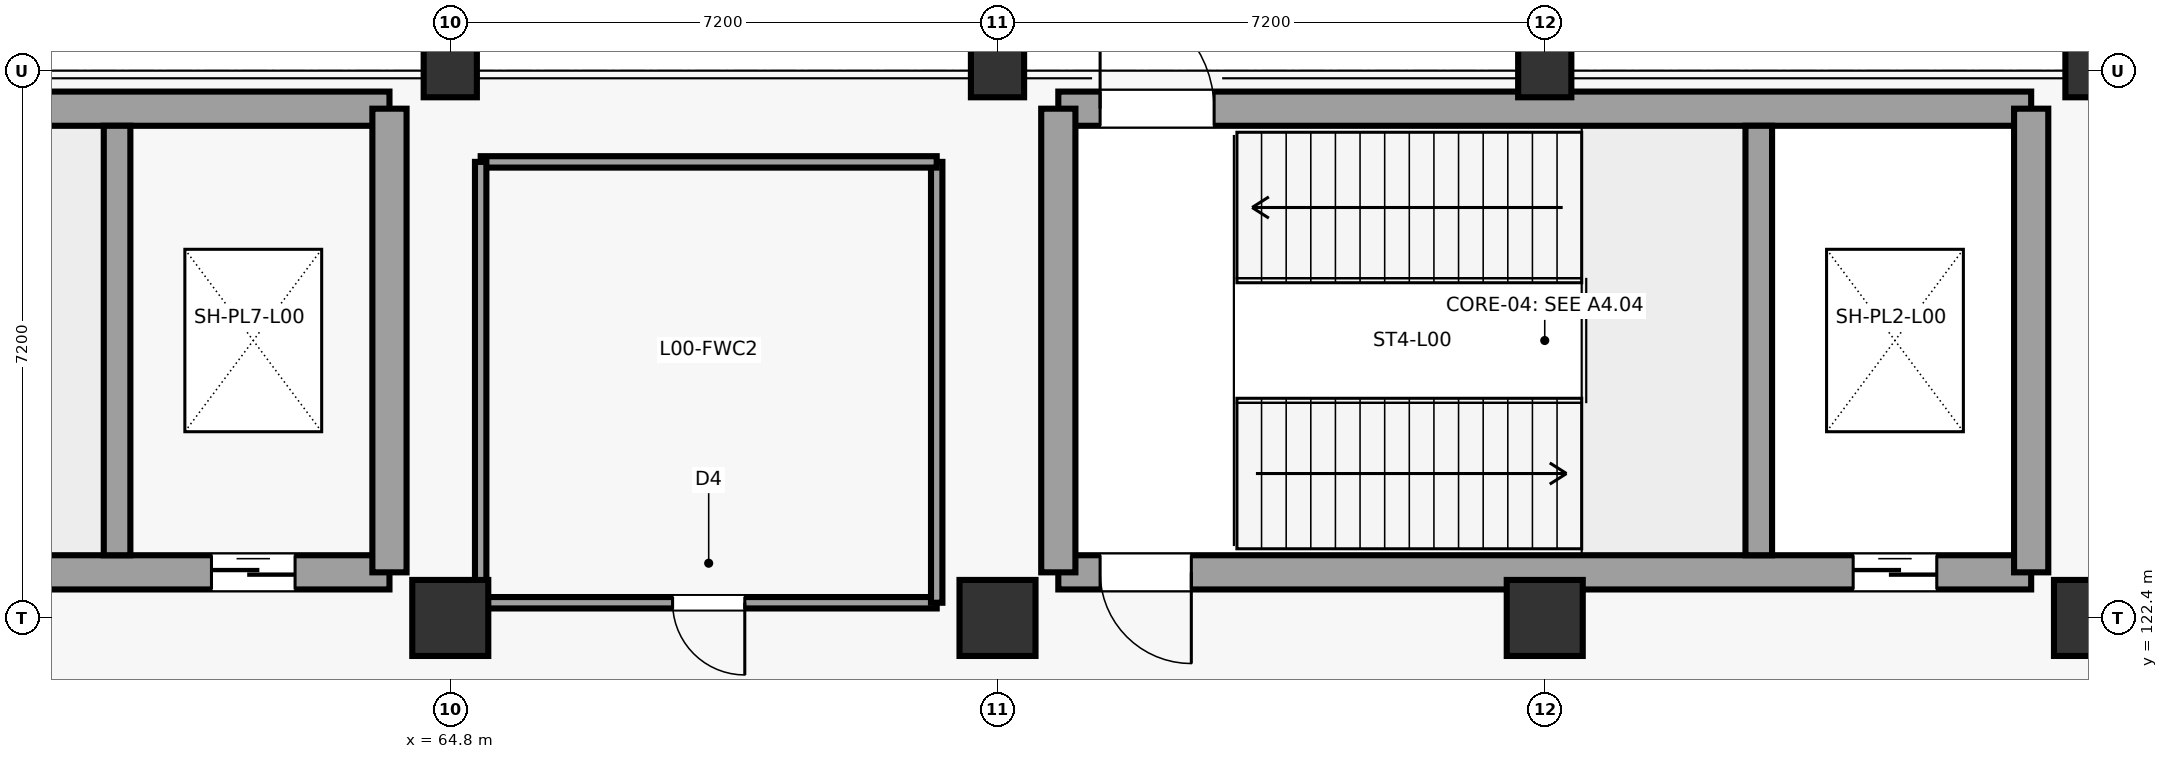
"""IFC4 building model, lengths in metres.
Left out: names, types, materials, properties, quantities, classifications, styles, units other than length and angle.
Written with IfcOpenShell. Run it as: python <this file> out.ifc"""

import sys

from ifc_helpers import new_model, si_unit, direction, frame, frame_2d, origin, origin_2d, place, context, subcontext, project, spatial, rectangle, circle, extrude, element, fill, save


model = new_model("IFC4")
c1 = context("Model", 3, precision=1e-05, world=origin(), true_north=direction((0.0, 1.0)))
c2 = subcontext(c1, "Body", "Model", "MODEL_VIEW")
j1 = project(units=[si_unit("LENGTHUNIT", "METRE"), si_unit("PLANEANGLEUNIT", "RADIAN")], contexts=[c1])
p1 = place(None, origin())
s1 = spatial("IfcSite", under=j1, at=p1, CompositionType="ELEMENT")
p2 = place(p1, origin())
s2 = spatial("IfcBuilding", under=s1, at=p2, CompositionType="ELEMENT")
p3 = place(p2, origin())
s3 = spatial("IfcBuildingStorey", under=s2, at=p3, CompositionType="ELEMENT", Elevation=0.0)
p4 = place(p3, frame((64.8, 122.4, 0.0), z_axis=(0.0, 0.0, 1.0), x_axis=(1.0, 0.0, 0.0)))
e1 = element("IfcColumn", 1, at=p4, inside=s3, PredefinedType="COLUMN", context=c2, shape_type="SweptSolid", body=[
    extrude(circle(Radius=0.5, at=origin_2d()), origin(), (0.0, 0.0, 1.0), 5.4),
])
p5 = place(p3, frame((64.8, 129.6, 0.0), z_axis=(0.0, 0.0, 1.0), x_axis=(1.0, 0.0, 0.0)))
e2 = element("IfcColumn", 2, at=p5, inside=s3, PredefinedType="COLUMN", context=c2, shape_type="SweptSolid", body=[
    extrude(rectangle(XDim=0.7, YDim=0.7, at=origin_2d()), origin(), (0.0, 0.0, 1.0), 5.4),
])
p6 = place(p3, frame((72.0, 122.4, 0.0), z_axis=(0.0, 0.0, 1.0), x_axis=(1.0, 0.0, 0.0)))
e3 = element("IfcColumn", 3, at=p6, inside=s3, PredefinedType="COLUMN", context=c2, shape_type="SweptSolid", body=[
    extrude(circle(Radius=0.5, at=origin_2d()), origin(), (0.0, 0.0, 1.0), 5.4),
])
p7 = place(p3, frame((72.0, 129.6, 0.0), z_axis=(0.0, 0.0, 1.0), x_axis=(1.0, 0.0, 0.0)))
e4 = element("IfcColumn", 4, at=p7, inside=s3, PredefinedType="COLUMN", context=c2, shape_type="SweptSolid", body=[
    extrude(rectangle(XDim=0.7, YDim=0.7, at=origin_2d()), origin(), (0.0, 0.0, 1.0), 5.4),
])
p8 = place(p3, frame((79.2, 122.4, 0.0), z_axis=(0.0, 0.0, 1.0), x_axis=(1.0, 0.0, 0.0)))
e5 = element("IfcColumn", 5, at=p8, inside=s3, PredefinedType="COLUMN", context=c2, shape_type="SweptSolid", body=[
    extrude(circle(Radius=0.5, at=origin_2d()), origin(), (0.0, 0.0, 1.0), 5.4),
])
p9 = place(p3, frame((79.2, 129.6, 0.0), z_axis=(0.0, 0.0, 1.0), x_axis=(1.0, 0.0, 0.0)))
e6 = element("IfcColumn", 6, at=p9, inside=s3, PredefinedType="COLUMN", context=c2, shape_type="SweptSolid", body=[
    extrude(rectangle(XDim=0.7, YDim=0.7, at=origin_2d()), origin(), (0.0, 0.0, 1.0), 5.4),
])
p10 = place(p3, frame((86.4, 122.4, 0.0), z_axis=(0.0, 0.0, 1.0), x_axis=(1.0, 0.0, 0.0)))
e7 = element("IfcColumn", 7, at=p10, inside=s3, PredefinedType="COLUMN", context=c2, shape_type="SweptSolid", body=[
    extrude(circle(Radius=0.5, at=origin_2d()), origin(), (0.0, 0.0, 1.0), 5.4),
])
p11 = place(p3, frame((86.4, 129.6, 0.0), z_axis=(0.0, 0.0, 1.0), x_axis=(1.0, 0.0, 0.0)))
e8 = element("IfcColumn", 8, at=p11, inside=s3, PredefinedType="COLUMN", context=c2, shape_type="SweptSolid", body=[
    extrude(rectangle(XDim=0.7, YDim=0.7, at=origin_2d()), origin(), (0.0, 0.0, 1.0), 5.4),
])
p12 = place(p3, frame((72.8, 123.0, 0.0), z_axis=(0.0, 0.0, 1.0), x_axis=(1.0, 0.0, 0.0)))
e9 = element("IfcWall", 9, at=p12, inside=s3, PredefinedType="SHEAR", context=c2, shape_type="SweptSolid", body=[
    extrude(rectangle(XDim=12.8, YDim=0.45, at=frame_2d((6.4, 0.0))), origin(), (0.0, 0.0, 1.0), 5.06),
])
p13 = place(p12, frame((0.55, 0.0, 0.0)))
e10 = element("IfcOpeningElement", 10, at=p13, cuts=e9, PredefinedType="OPENING", context=c2, shape_type="SweptSolid", body=[
    extrude(rectangle(XDim=1.2, YDim=2.25, at=frame_2d((0.6, 1.125))), frame((0.0, 0.235, 0.0), z_axis=(0.0, -1.0, 0.0), x_axis=(1.0, 0.0, 0.0)), (0.0, 0.0, 1.0), 0.47),
])
p14 = place(p12, frame((10.458, 0.0, 0.0)))
e11 = element("IfcOpeningElement", 11, at=p14, cuts=e9, PredefinedType="OPENING", context=c2, shape_type="SweptSolid", body=[
    extrude(rectangle(XDim=1.1, YDim=2.2, at=frame_2d((0.55, 1.1))), frame((0.0, 0.235, 0.0), z_axis=(0.0, -1.0, 0.0), x_axis=(1.0, 0.0, 0.0)), (0.0, 0.0, 1.0), 0.47),
])
p15 = place(p3, frame((72.8, 129.1, 0.0), z_axis=(0.0, 0.0, 1.0), x_axis=(1.0, 0.0, 0.0)))
e12 = element("IfcWall", 12, at=p15, inside=s3, PredefinedType="SHEAR", context=c2, shape_type="SweptSolid", body=[
    extrude(rectangle(XDim=12.8, YDim=0.45, at=frame_2d((6.4, 0.0))), origin(), (0.0, 0.0, 1.0), 5.06),
])
p16 = place(p15, frame((0.55, 0.0, 0.0)))
e13 = element("IfcOpeningElement", 13, at=p16, cuts=e12, PredefinedType="OPENING", context=c2, shape_type="SweptSolid", body=[
    extrude(rectangle(XDim=1.5, YDim=2.25, at=frame_2d((0.75, 1.125))), frame((0.0, 0.235, 0.0), z_axis=(0.0, -1.0, 0.0), x_axis=(1.0, 0.0, 0.0)), (0.0, 0.0, 1.0), 0.47),
])
for number, where, z_axis, x_axis in (
    (14, (72.8, 123.0, 0.0), (0.0, 0.0, 1.0), (0.0, 1.0, 0.0)),
    (15, (85.6, 123.0, 0.0), (0.0, 0.0, 1.0), (0.0, 1.0, 0.0)),
):
    element("IfcWall", number, at=place(p3, frame(where, z_axis=z_axis, x_axis=x_axis)), inside=s3, PredefinedType="SHEAR", context=c2, shape_type="SweptSolid", body=[
        extrude(rectangle(XDim=6.1, YDim=0.45, at=frame_2d((3.05, 0.0))), origin(), (0.0, 0.0, 1.0), 5.06),
    ])
p17 = place(p3, frame((82.016, 123.225, 0.0), z_axis=(0.0, 0.0, 1.0), x_axis=(0.0, 1.0, 0.0)))
e16 = element("IfcWall", 16, at=p17, inside=s3, PredefinedType="SHEAR", context=c2, shape_type="SweptSolid", body=[
    extrude(rectangle(XDim=5.65, YDim=0.35, at=frame_2d((2.825, 0.0))), origin(), (0.0, 0.0, 1.0), 5.06),
])
p18 = place(p3, frame((51.2, 123.0, 0.0), z_axis=(0.0, 0.0, 1.0), x_axis=(1.0, 0.0, 0.0)))
e17 = element("IfcWall", 17, at=p18, inside=s3, PredefinedType="SHEAR", context=c2, shape_type="SweptSolid", body=[
    extrude(rectangle(XDim=12.8, YDim=0.45, at=frame_2d((6.4, 0.0))), origin(), (0.0, 0.0, 1.0), 5.06),
])
p19 = place(p18, frame((0.55, 0.0, 0.0)))
e18 = element("IfcOpeningElement", 18, at=p19, cuts=e17, PredefinedType="OPENING", context=c2, shape_type="SweptSolid", body=[
    extrude(rectangle(XDim=1.2, YDim=2.25, at=frame_2d((0.6, 1.125))), frame((0.0, 0.235, 0.0), z_axis=(0.0, -1.0, 0.0), x_axis=(1.0, 0.0, 0.0)), (0.0, 0.0, 1.0), 0.47),
])
p20 = place(p18, frame((10.458, 0.0, 0.0)))
e19 = element("IfcOpeningElement", 19, at=p20, cuts=e17, PredefinedType="OPENING", context=c2, shape_type="SweptSolid", body=[
    extrude(rectangle(XDim=1.1, YDim=2.2, at=frame_2d((0.55, 1.1))), frame((0.0, 0.235, 0.0), z_axis=(0.0, -1.0, 0.0), x_axis=(1.0, 0.0, 0.0)), (0.0, 0.0, 1.0), 0.47),
])
p21 = place(p3, frame((51.2, 129.1, 0.0), z_axis=(0.0, 0.0, 1.0), x_axis=(1.0, 0.0, 0.0)))
e20 = element("IfcWall", 20, at=p21, inside=s3, PredefinedType="SHEAR", context=c2, shape_type="SweptSolid", body=[
    extrude(rectangle(XDim=12.8, YDim=0.45, at=frame_2d((6.4, 0.0))), origin(), (0.0, 0.0, 1.0), 5.06),
])
p22 = place(p21, frame((0.55, 0.0, 0.0)))
e21 = element("IfcOpeningElement", 21, at=p22, cuts=e20, PredefinedType="OPENING", context=c2, shape_type="SweptSolid", body=[
    extrude(rectangle(XDim=1.5, YDim=2.25, at=frame_2d((0.75, 1.125))), frame((0.0, 0.235, 0.0), z_axis=(0.0, -1.0, 0.0), x_axis=(1.0, 0.0, 0.0)), (0.0, 0.0, 1.0), 0.47),
])
p23 = place(p3, frame((64.0, 123.0, 0.0), z_axis=(0.0, 0.0, 1.0), x_axis=(0.0, 1.0, 0.0)))
e22 = element("IfcWall", 22, at=p23, inside=s3, PredefinedType="SHEAR", context=c2, shape_type="SweptSolid", body=[
    extrude(rectangle(XDim=6.1, YDim=0.45, at=frame_2d((3.05, 0.0))), origin(), (0.0, 0.0, 1.0), 5.06),
])
p24 = place(p3, frame((60.416, 123.225, 0.0), z_axis=(0.0, 0.0, 1.0), x_axis=(0.0, 1.0, 0.0)))
e23 = element("IfcWall", 23, at=p24, inside=s3, PredefinedType="SHEAR", context=c2, shape_type="SweptSolid", body=[
    extrude(rectangle(XDim=5.65, YDim=0.35, at=frame_2d((2.825, 0.0))), origin(), (0.0, 0.0, 1.0), 5.06),
])
p25 = place(p3, frame((65.2, 122.6, 0.0), z_axis=(0.0, 0.0, 1.0), x_axis=(1.0, 0.0, 0.0)))
e24 = element("IfcWall", 24, at=p25, inside=s3, PredefinedType="PARTITIONING", context=c2, shape_type="SweptSolid", body=[
    extrude(rectangle(XDim=6.0, YDim=0.15, at=frame_2d((3.0, 0.0))), origin(), (0.0, 0.0, 1.0), 4.1),
])
p26 = place(p25, frame((2.525, 0.0, 0.0)))
e25 = element("IfcOpeningElement", 25, at=p26, cuts=e24, PredefinedType="OPENING", context=c2, shape_type="SweptSolid", body=[
    extrude(rectangle(XDim=0.95, YDim=2.15, at=frame_2d((0.475, 1.075))), frame((0.0, 0.085, 0.0), z_axis=(0.0, -1.0, 0.0), x_axis=(1.0, 0.0, 0.0)), (0.0, 0.0, 1.0), 0.17),
])
p27 = place(p3, frame((71.2, 122.6, 0.0), z_axis=(0.0, 0.0, 1.0), x_axis=(0.0, 1.0, 0.0)))
e26 = element("IfcWall", 26, at=p27, inside=s3, PredefinedType="PARTITIONING", context=c2, shape_type="SweptSolid", body=[
    extrude(rectangle(XDim=5.8, YDim=0.15, at=frame_2d((2.9, 0.0))), origin(), (0.0, 0.0, 1.0), 4.1),
])
p28 = place(p3, frame((71.2, 128.4, 0.0), z_axis=(0.0, 0.0, 1.0), x_axis=(-1.0, 0.0, 0.0)))
e27 = element("IfcWall", 27, at=p28, inside=s3, PredefinedType="PARTITIONING", context=c2, shape_type="SweptSolid", body=[
    extrude(rectangle(XDim=6.0, YDim=0.15, at=frame_2d((3.0, 0.0))), origin(), (0.0, 0.0, 1.0), 4.1),
])
p29 = place(p3, frame((65.2, 128.4, 0.0), z_axis=(0.0, 0.0, 1.0), x_axis=(0.0, -1.0, 0.0)))
e28 = element("IfcWall", 28, at=p29, inside=s3, PredefinedType="PARTITIONING", context=c2, shape_type="SweptSolid", body=[
    extrude(rectangle(XDim=5.8, YDim=0.15, at=frame_2d((2.9, 0.0))), origin(), (0.0, 0.0, 1.0), 4.1),
])
p30 = place(p13, frame((1.2, 0.0, 0.0), z_axis=(0.0, 0.0, 1.0), x_axis=(-1.0, 0.0, 0.0)))
e29 = element("IfcDoor", 29, at=p30, inside=s3, OperationType="SINGLE_SWING_RIGHT", PredefinedType="DOOR", context=c2, shape_type="SweptSolid", body=[
    extrude(rectangle(XDim=1.2, YDim=2.25, at=frame_2d((0.6, 1.125))), frame((0.0, 0.025, 0.0), z_axis=(0.0, -1.0, 0.0), x_axis=(1.0, 0.0, 0.0)), (0.0, 0.0, 1.0), 0.05),
])
fill(e10, e29)
p31 = place(p16, origin())
e30 = element("IfcDoor", 30, at=p31, inside=s3, OperationType="SINGLE_SWING_LEFT", PredefinedType="DOOR", context=c2, shape_type="SweptSolid", body=[
    extrude(rectangle(XDim=1.5, YDim=2.25, at=frame_2d((0.75, 1.125))), frame((0.0, 0.025, 0.0), z_axis=(0.0, -1.0, 0.0), x_axis=(1.0, 0.0, 0.0)), (0.0, 0.0, 1.0), 0.05),
])
fill(e13, e30)
p32 = place(p14, origin())
e31 = element("IfcDoor", 31, at=p32, inside=s3, OperationType="SLIDING_TO_RIGHT", PredefinedType="DOOR", context=c2, shape_type="SweptSolid", body=[
    extrude(rectangle(XDim=1.1, YDim=2.2, at=frame_2d((0.55, 1.1))), frame((0.0, 0.025, 0.0), z_axis=(0.0, -1.0, 0.0), x_axis=(1.0, 0.0, 0.0)), (0.0, 0.0, 1.0), 0.05),
])
fill(e11, e31)
p33 = place(p20, origin())
e32 = element("IfcDoor", 32, at=p33, inside=s3, OperationType="SLIDING_TO_LEFT", PredefinedType="DOOR", context=c2, shape_type="SweptSolid", body=[
    extrude(rectangle(XDim=1.1, YDim=2.2, at=frame_2d((0.55, 1.1))), frame((0.0, 0.025, 0.0), z_axis=(0.0, -1.0, 0.0), x_axis=(1.0, 0.0, 0.0)), (0.0, 0.0, 1.0), 0.05),
])
fill(e19, e32)
p34 = place(p26, frame((0.95, 0.0, 0.0), z_axis=(0.0, 0.0, 1.0), x_axis=(-1.0, 0.0, 0.0)))
e33 = element("IfcDoor", 33, at=p34, inside=s3, OperationType="SINGLE_SWING_RIGHT", PredefinedType="DOOR", context=c2, shape_type="SweptSolid", body=[
    extrude(rectangle(XDim=0.95, YDim=2.15, at=frame_2d((0.475, 1.075))), frame((0.0, 0.025, 0.0), z_axis=(0.0, -1.0, 0.0), x_axis=(1.0, 0.0, 0.0)), (0.0, 0.0, 1.0), 0.05),
])
fill(e25, e33)
save(model, sys.argv[1])
